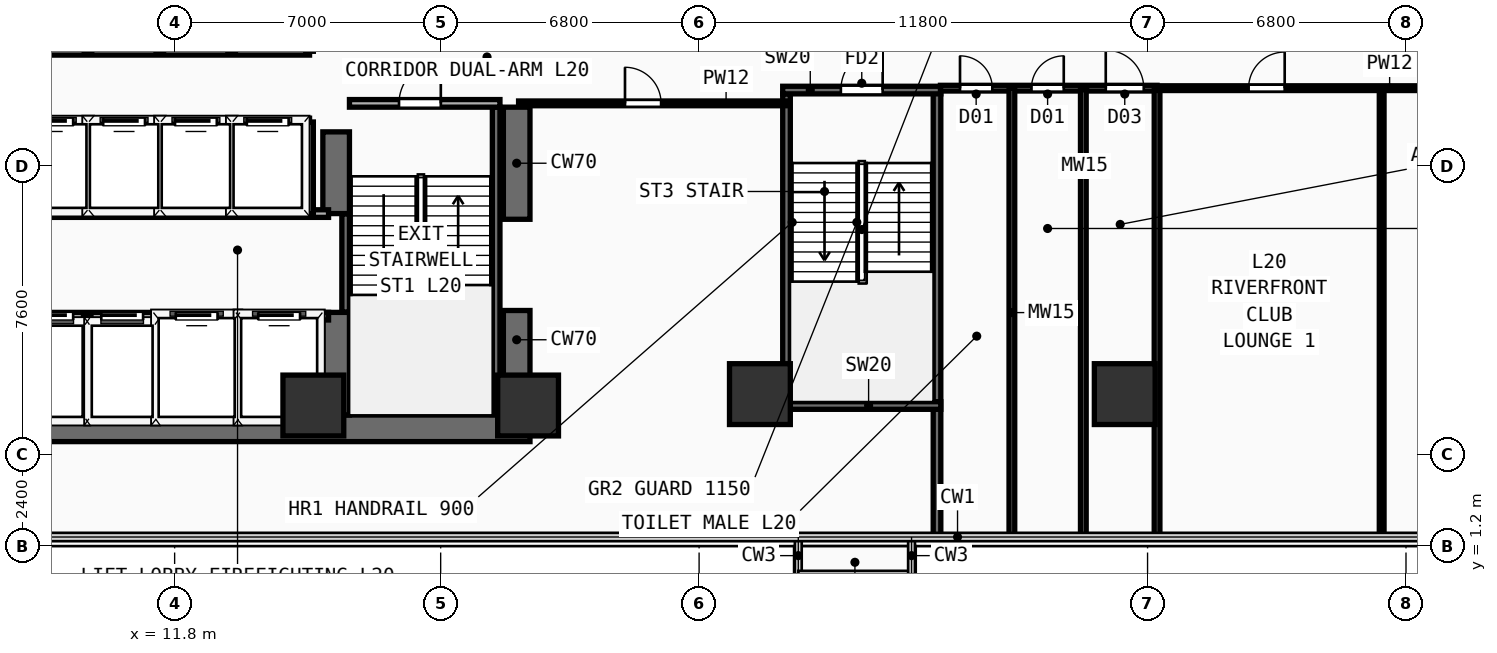
"""IFC4 building model, lengths in metres.
Left out: names, types, materials, properties, quantities, classifications, styles, units other than length and angle.
Written with IfcOpenShell. Run it as: python <this file> out.ifc"""

import sys

from ifc_helpers import new_model, si_unit, direction, frame, frame_2d, origin, origin_2d, place, context, subcontext, project, spatial, rectangle, extrude, element, fill, save


model = new_model("IFC4")
c1 = context("Model", 3, precision=1e-05, world=origin(), true_north=direction((0.0, 1.0)))
c2 = subcontext(c1, "Body", "Model", "MODEL_VIEW")
j1 = project(units=[si_unit("LENGTHUNIT", "METRE"), si_unit("PLANEANGLEUNIT", "RADIAN")], contexts=[c1])
p1 = place(None, origin())
s1 = spatial("IfcSite", under=j1, at=p1, CompositionType="ELEMENT")
p2 = place(p1, origin())
s2 = spatial("IfcBuilding", under=s1, at=p2, CompositionType="ELEMENT")
p3 = place(p2, frame((0.0, 0.0, 79.0)))
s3 = spatial("IfcBuildingStorey", under=s2, at=p3, CompositionType="ELEMENT", Elevation=79.0)
p4 = place(p3, frame((7.1, 4.3, 0.0), z_axis=(0.0, 0.0, 1.0), x_axis=(1.0, 0.0, 0.0)))
e1 = element("IfcWall", 1, at=p4, inside=s3, PredefinedType="SHEAR", context=c2, shape_type="SweptSolid", body=[
    extrude(rectangle(XDim=14.05, YDim=0.7, at=frame_2d((7.025, 0.0))), origin(), (0.0, 0.0, 1.0), 3.42),
])
p5 = place(p3, frame((20.8, 4.65, 0.0), z_axis=(0.0, 0.0, 1.0), x_axis=(0.0, 1.0, 0.0)))
e2 = element("IfcWall", 2, at=p5, inside=s3, PredefinedType="SHEAR", context=c2, shape_type="SweptSolid", body=[
    extrude(rectangle(XDim=2.75, YDim=0.7, at=frame_2d((1.375, 0.0))), origin(), (0.0, 0.0, 1.0), 3.42),
])
p6 = place(p3, frame((20.8, 9.8, 0.0), z_axis=(0.0, 0.0, 1.0), x_axis=(0.0, 1.0, 0.0)))
e3 = element("IfcWall", 3, at=p6, inside=s3, PredefinedType="SHEAR", context=c2, shape_type="SweptSolid", body=[
    extrude(rectangle(XDim=2.95, YDim=0.7, at=frame_2d((1.475, 0.0))), origin(), (0.0, 0.0, 1.0), 3.42),
])
p7 = place(p3, frame((16.05, 4.65, 0.0), z_axis=(0.0, 0.0, 1.0), x_axis=(0.0, 1.0, 0.0)))
e4 = element("IfcWall", 4, at=p7, inside=s3, PredefinedType="SHEAR", context=c2, shape_type="SweptSolid", body=[
    extrude(rectangle(XDim=2.7, YDim=0.7, at=frame_2d((1.35, 0.0))), origin(), (0.0, 0.0, 1.0), 3.42),
])
p8 = place(p3, frame((16.05, 9.95, 0.0), z_axis=(0.0, 0.0, 1.0), x_axis=(0.0, 1.0, 0.0)))
e5 = element("IfcWall", 5, at=p8, inside=s3, PredefinedType="SHEAR", context=c2, shape_type="SweptSolid", body=[
    extrude(rectangle(XDim=2.15, YDim=0.7, at=frame_2d((1.075, 0.0))), origin(), (0.0, 0.0, 1.0), 3.42),
])
for number, where, z_axis, x_axis in (
    (6, (15.45, 4.9, 0.0), (0.0, 0.0, 1.0), (1.0, 0.0, 0.0)),
    (7, (21.1, 4.9, 0.0), (0.0, 0.0, 1.0), (1.0, 0.0, 0.0)),
    (8, (27.2, 5.2, 0.0), (0.0, 0.0, 1.0), (1.0, 0.0, 0.0)),
    (9, (36.8, 5.2, 0.0), (0.0, 0.0, 1.0), (1.0, 0.0, 0.0)),
):
    element("IfcColumn", number, at=place(p3, frame(where, z_axis=z_axis, x_axis=x_axis)), inside=s3, PredefinedType="COLUMN", context=c2, shape_type="SweptSolid", body=[
        extrude(rectangle(XDim=1.6, YDim=1.6, at=origin_2d()), origin(), (0.0, 0.0, 1.0), 3.42),
    ])
p9 = place(p3, frame((16.3, 7.36, 0.0), z_axis=(0.0, 0.0, 1.0), x_axis=(0.0, 1.0, 0.0)))
e10 = element("IfcWall", 10, at=p9, inside=s3, PredefinedType="SHEAR", context=c2, shape_type="SweptSolid", body=[
    extrude(rectangle(XDim=2.58, YDim=0.2, at=frame_2d((1.29, 0.0))), origin(), (0.0, 0.0, 1.0), 3.42),
])
p10 = place(p3, frame((20.26, 4.66, 0.0), z_axis=(0.0, 0.0, 1.0), x_axis=(0.0, 1.0, 0.0)))
e11 = element("IfcWall", 11, at=p10, inside=s3, PredefinedType="SHEAR", context=c2, shape_type="SweptSolid", body=[
    extrude(rectangle(XDim=8.09, YDim=0.2, at=frame_2d((4.045, 0.0))), origin(), (0.0, 0.0, 1.0), 3.42),
])
p11 = place(p3, frame((16.4, 12.85, 0.0), z_axis=(0.0, 0.0, 1.0), x_axis=(1.0, 0.0, 0.0)))
e12 = element("IfcWall", 12, at=p11, inside=s3, PredefinedType="PARTITIONING", context=c2, shape_type="SweptSolid", body=[
    extrude(rectangle(XDim=3.96, YDim=0.2, at=frame_2d((1.98, 0.0))), origin(), (0.0, 0.0, 1.0), 3.42),
])
p12 = place(p11, frame((1.304, 0.0, 0.0)))
e13 = element("IfcOpeningElement", 13, at=p12, cuts=e12, PredefinedType="OPENING", context=c2, shape_type="SweptSolid", body=[
    extrude(rectangle(XDim=1.1, YDim=2.2, at=frame_2d((0.55, 1.1))), frame((0.0, 0.11, 0.0), z_axis=(0.0, -1.0, 0.0), x_axis=(1.0, 0.0, 0.0)), (0.0, 0.0, 1.0), 0.22),
])
p13 = place(p3, frame((27.9, 5.0, 0.0), z_axis=(0.0, 0.0, 1.0), x_axis=(0.0, 1.0, 0.0)))
e14 = element("IfcWall", 14, at=p13, inside=s3, PredefinedType="SHEAR", context=c2, shape_type="SweptSolid", body=[
    extrude(rectangle(XDim=8.1, YDim=0.2, at=frame_2d((4.05, 0.0))), origin(), (0.0, 0.0, 1.0), 3.42),
])
p14 = place(p3, frame((31.86, 1.44, 0.0), z_axis=(0.0, 0.0, 1.0), x_axis=(0.0, 1.0, 0.0)))
e15 = element("IfcWall", 15, at=p14, inside=s3, PredefinedType="SHEAR", context=c2, shape_type="SweptSolid", body=[
    extrude(rectangle(XDim=11.81, YDim=0.2, at=frame_2d((5.905, 0.0))), origin(), (0.0, 0.0, 1.0), 3.42),
])
p15 = place(p3, frame((27.8, 4.9, 0.0), z_axis=(0.0, 0.0, 1.0), x_axis=(1.0, 0.0, 0.0)))
e16 = element("IfcWall", 16, at=p15, inside=s3, PredefinedType="SHEAR", context=c2, shape_type="SweptSolid", body=[
    extrude(rectangle(XDim=4.16, YDim=0.2, at=frame_2d((2.08, 0.0))), origin(), (0.0, 0.0, 1.0), 3.42),
])
p16 = place(p3, frame((27.8, 13.2, 0.0), z_axis=(0.0, 0.0, 1.0), x_axis=(1.0, 0.0, 0.0)))
e17 = element("IfcWall", 17, at=p16, inside=s3, PredefinedType="SHEAR", context=c2, shape_type="SweptSolid", body=[
    extrude(rectangle(XDim=4.16, YDim=0.2, at=frame_2d((2.08, 0.0))), origin(), (0.0, 0.0, 1.0), 3.42),
])
p17 = place(p16, frame((1.53, 0.0, 0.0)))
e18 = element("IfcOpeningElement", 18, at=p17, cuts=e17, PredefinedType="OPENING", context=c2, shape_type="SweptSolid", body=[
    extrude(rectangle(XDim=1.1, YDim=2.2, at=frame_2d((0.55, 1.1))), frame((0.0, 0.11, 0.0), z_axis=(0.0, -1.0, 0.0), x_axis=(1.0, 0.0, 0.0)), (0.0, 0.0, 1.0), 0.22),
])
p18 = place(p3, frame((7.5, 7.25, 0.0), z_axis=(0.0, 0.0, 1.0), x_axis=(1.0, 0.0, 0.0)))
e19 = element("IfcWall", 19, at=p18, inside=s3, PredefinedType="PARTITIONING", context=c2, shape_type="SweptSolid", body=[
    extrude(rectangle(XDim=8.35, YDim=0.2, at=frame_2d((4.175, 0.0))), origin(), (0.0, 0.0, 1.0), 3.42),
])
p19 = place(p18, frame((0.53, 0.0, 0.0)))
e20 = element("IfcOpeningElement", 20, at=p19, cuts=e19, PredefinedType="OPENING", context=c2, shape_type="SweptSolid", body=[
    extrude(rectangle(XDim=1.1, YDim=2.2, at=frame_2d((0.55, 1.1))), frame((0.0, 0.11, 0.0), z_axis=(0.0, -1.0, 0.0), x_axis=(1.0, 0.0, 0.0)), (0.0, 0.0, 1.0), 0.22),
])
p20 = place(p18, frame((2.37, 0.0, 0.0)))
e21 = element("IfcOpeningElement", 21, at=p20, cuts=e19, PredefinedType="OPENING", context=c2, shape_type="SweptSolid", body=[
    extrude(rectangle(XDim=1.1, YDim=2.2, at=frame_2d((0.55, 1.1))), frame((0.0, 0.11, 0.0), z_axis=(0.0, -1.0, 0.0), x_axis=(1.0, 0.0, 0.0)), (0.0, 0.0, 1.0), 0.22),
])
p21 = place(p18, frame((4.33, 0.0, 0.0)))
e22 = element("IfcOpeningElement", 22, at=p21, cuts=e19, PredefinedType="OPENING", context=c2, shape_type="SweptSolid", body=[
    extrude(rectangle(XDim=1.1, YDim=2.2, at=frame_2d((0.55, 1.1))), frame((0.0, 0.11, 0.0), z_axis=(0.0, -1.0, 0.0), x_axis=(1.0, 0.0, 0.0)), (0.0, 0.0, 1.0), 0.22),
])
p22 = place(p18, frame((6.5, 0.0, 0.0)))
e23 = element("IfcOpeningElement", 23, at=p22, cuts=e19, PredefinedType="OPENING", context=c2, shape_type="SweptSolid", body=[
    extrude(rectangle(XDim=1.1, YDim=2.2, at=frame_2d((0.55, 1.1))), frame((0.0, 0.11, 0.0), z_axis=(0.0, -1.0, 0.0), x_axis=(1.0, 0.0, 0.0)), (0.0, 0.0, 1.0), 0.22),
])
p23 = place(p3, frame((7.5, 9.95, 0.0), z_axis=(0.0, 0.0, 1.0), x_axis=(1.0, 0.0, 0.0)))
e24 = element("IfcWall", 24, at=p23, inside=s3, PredefinedType="PARTITIONING", context=c2, shape_type="SweptSolid", body=[
    extrude(rectangle(XDim=8.35, YDim=0.2, at=frame_2d((4.175, 0.0))), origin(), (0.0, 0.0, 1.0), 3.42),
])
for number, where, z_axis, x_axis in (
    (25, (9.5, 4.45, 0.0), (0.0, 0.0, 1.0), (0.0, 1.0, 0.0)),
    (26, (11.36, 4.45, 0.0), (0.0, 0.0, 1.0), (0.0, 1.0, 0.0)),
    (27, (13.46, 4.45, 0.0), (0.0, 0.0, 1.0), (0.0, 1.0, 0.0)),
):
    element("IfcWall", number, at=place(p3, frame(where, z_axis=z_axis, x_axis=x_axis)), inside=s3, PredefinedType="PARTITIONING", context=c2, shape_type="SweptSolid", body=[
        extrude(rectangle(XDim=2.8, YDim=0.2, at=frame_2d((1.4, 0.0))), origin(), (0.0, 0.0, 1.0), 3.42),
    ])
p24 = place(p3, frame((7.5, 12.36, 0.0), z_axis=(0.0, 0.0, 1.0), x_axis=(1.0, 0.0, 0.0)))
e28 = element("IfcWall", 28, at=p24, inside=s3, PredefinedType="PARTITIONING", context=c2, shape_type="SweptSolid", body=[
    extrude(rectangle(XDim=7.85, YDim=0.2, at=frame_2d((3.925, 0.0))), origin(), (0.0, 0.0, 1.0), 3.42),
])
p25 = place(p24, frame((0.53, 0.0, 0.0)))
e29 = element("IfcOpeningElement", 29, at=p25, cuts=e28, PredefinedType="OPENING", context=c2, shape_type="SweptSolid", body=[
    extrude(rectangle(XDim=1.1, YDim=2.2, at=frame_2d((0.55, 1.1))), frame((0.0, 0.11, 0.0), z_axis=(0.0, -1.0, 0.0), x_axis=(1.0, 0.0, 0.0)), (0.0, 0.0, 1.0), 0.22),
])
p26 = place(p24, frame((2.42, 0.0, 0.0)))
e30 = element("IfcOpeningElement", 30, at=p26, cuts=e28, PredefinedType="OPENING", context=c2, shape_type="SweptSolid", body=[
    extrude(rectangle(XDim=1.1, YDim=2.2, at=frame_2d((0.55, 1.1))), frame((0.0, 0.11, 0.0), z_axis=(0.0, -1.0, 0.0), x_axis=(1.0, 0.0, 0.0)), (0.0, 0.0, 1.0), 0.22),
])
p27 = place(p24, frame((4.31, 0.0, 0.0)))
e31 = element("IfcOpeningElement", 31, at=p27, cuts=e28, PredefinedType="OPENING", context=c2, shape_type="SweptSolid", body=[
    extrude(rectangle(XDim=1.1, YDim=2.2, at=frame_2d((0.55, 1.1))), frame((0.0, 0.11, 0.0), z_axis=(0.0, -1.0, 0.0), x_axis=(1.0, 0.0, 0.0)), (0.0, 0.0, 1.0), 0.22),
])
p28 = place(p24, frame((6.2, 0.0, 0.0)))
e32 = element("IfcOpeningElement", 32, at=p28, cuts=e28, PredefinedType="OPENING", context=c2, shape_type="SweptSolid", body=[
    extrude(rectangle(XDim=1.1, YDim=2.2, at=frame_2d((0.55, 1.1))), frame((0.0, 0.11, 0.0), z_axis=(0.0, -1.0, 0.0), x_axis=(1.0, 0.0, 0.0)), (0.0, 0.0, 1.0), 0.22),
])
for number, where, z_axis, x_axis in (
    (33, (15.35, 9.95, 0.0), (0.0, 0.0, 1.0), (0.0, 1.0, 0.0)),
    (34, (9.52, 9.95, 0.0), (0.0, 0.0, 1.0), (0.0, 1.0, 0.0)),
    (35, (11.41, 9.95, 0.0), (0.0, 0.0, 1.0), (0.0, 1.0, 0.0)),
    (36, (13.3, 9.95, 0.0), (0.0, 0.0, 1.0), (0.0, 1.0, 0.0)),
):
    element("IfcWall", number, at=place(p3, frame(where, z_axis=z_axis, x_axis=x_axis)), inside=s3, PredefinedType="PARTITIONING", context=c2, shape_type="SweptSolid", body=[
        extrude(rectangle(XDim=2.41, YDim=0.2, at=frame_2d((1.205, 0.0))), origin(), (0.0, 0.0, 1.0), 3.42),
    ])
p29 = place(p3, frame((7.5, 14.22, 0.0), z_axis=(0.0, 0.0, 1.0), x_axis=(1.0, 0.0, 0.0)))
e37 = element("IfcWall", 37, at=p29, inside=s3, PredefinedType="PARTITIONING", context=c2, shape_type="SweptSolid", body=[
    extrude(rectangle(XDim=7.85, YDim=0.2, at=frame_2d((3.925, 0.0))), origin(), (0.0, 0.0, 1.0), 3.42),
])
p30 = place(p3, frame((31.95, 13.25, 0.0), z_axis=(0.0, 0.0, 1.0), x_axis=(1.0, 0.0, 0.0)))
e38 = element("IfcWall", 38, at=p30, inside=s3, PredefinedType="PLUMBINGWALL", context=c2, shape_type="SweptSolid", body=[
    extrude(rectangle(XDim=5.7, YDim=0.15, at=frame_2d((2.85, 0.0))), origin(), (0.0, 0.0, 1.0), 2.92),
])
p31 = place(p30, frame((0.515, 0.0, 0.0)))
e39 = element("IfcOpeningElement", 39, at=p31, cuts=e38, PredefinedType="OPENING", context=c2, shape_type="SweptSolid", body=[
    extrude(rectangle(XDim=0.85, YDim=2.15, at=frame_2d((0.425, 1.075))), frame((0.0, 0.085, 0.0), z_axis=(0.0, -1.0, 0.0), x_axis=(1.0, 0.0, 0.0)), (0.0, 0.0, 1.0), 0.17),
])
p32 = place(p30, frame((2.395, 0.0, 0.0)))
e40 = element("IfcOpeningElement", 40, at=p32, cuts=e38, PredefinedType="OPENING", context=c2, shape_type="SweptSolid", body=[
    extrude(rectangle(XDim=0.85, YDim=2.15, at=frame_2d((0.425, 1.075))), frame((0.0, 0.085, 0.0), z_axis=(0.0, -1.0, 0.0), x_axis=(1.0, 0.0, 0.0)), (0.0, 0.0, 1.0), 0.17),
])
p33 = place(p30, frame((4.35, 0.0, 0.0)))
e41 = element("IfcOpeningElement", 41, at=p33, cuts=e38, PredefinedType="OPENING", context=c2, shape_type="SweptSolid", body=[
    extrude(rectangle(XDim=1.0, YDim=2.2, at=frame_2d((0.5, 1.1))), frame((0.0, 0.085, 0.0), z_axis=(0.0, -1.0, 0.0), x_axis=(1.0, 0.0, 0.0)), (0.0, 0.0, 1.0), 0.17),
])
for number, where, z_axis, x_axis in (
    (42, (33.83, 1.44, 0.0), (0.0, 0.0, 1.0), (0.0, 1.0, 0.0)),
    (43, (35.71, 1.44, 0.0), (0.0, 0.0, 1.0), (0.0, 1.0, 0.0)),
    (44, (37.65, 1.44, 0.0), (0.0, 0.0, 1.0), (0.0, 1.0, 0.0)),
):
    element("IfcWall", number, at=place(p3, frame(where, z_axis=z_axis, x_axis=x_axis)), inside=s3, PredefinedType="PLUMBINGWALL", context=c2, shape_type="SweptSolid", body=[
        extrude(rectangle(XDim=11.81, YDim=0.15, at=frame_2d((5.905, 0.0))), origin(), (0.0, 0.0, 1.0), 3.42),
    ])
p34 = place(p3, frame((20.85, 12.85, 0.0), z_axis=(0.0, 0.0, 1.0), x_axis=(1.0, 0.0, 0.0)))
e45 = element("IfcWall", 45, at=p34, inside=s3, PredefinedType="PARTITIONING", context=c2, shape_type="SweptSolid", body=[
    extrude(rectangle(XDim=7.05, YDim=0.125, at=frame_2d((3.525, 0.0))), origin(), (0.0, 0.0, 1.0), 3.42),
])
p35 = place(p34, frame((2.8, 0.0, 0.0)))
e46 = element("IfcOpeningElement", 46, at=p35, cuts=e45, PredefinedType="OPENING", context=c2, shape_type="SweptSolid", body=[
    extrude(rectangle(XDim=0.95, YDim=2.15, at=frame_2d((0.475, 1.075))), frame((0.0, 0.073, 0.0), z_axis=(0.0, -1.0, 0.0), x_axis=(1.0, 0.0, 0.0)), (0.0, 0.0, 1.0), 0.145),
])
p36 = place(p3, frame((37.65, 13.25, 0.0), z_axis=(0.0, 0.0, 1.0), x_axis=(1.0, 0.0, 0.0)))
e47 = element("IfcWall", 47, at=p36, inside=s3, PredefinedType="PARTITIONING", context=c2, shape_type="SweptSolid", body=[
    extrude(rectangle(XDim=13.75, YDim=0.125, at=frame_2d((6.875, 0.0))), origin(), (0.0, 0.0, 1.0), 2.92),
])
p37 = place(p36, frame((2.408, 0.0, 0.0)))
e48 = element("IfcOpeningElement", 48, at=p37, cuts=e47, PredefinedType="OPENING", context=c2, shape_type="SweptSolid", body=[
    extrude(rectangle(XDim=0.95, YDim=2.15, at=frame_2d((0.475, 1.075))), frame((0.0, 0.073, 0.0), z_axis=(0.0, -1.0, 0.0), x_axis=(1.0, 0.0, 0.0)), (0.0, 0.0, 1.0), 0.145),
])
p38 = place(p36, frame((8.88, 0.0, 0.0)))
e49 = element("IfcOpeningElement", 49, at=p38, cuts=e47, PredefinedType="OPENING", context=c2, shape_type="SweptSolid", body=[
    extrude(rectangle(XDim=0.95, YDim=2.15, at=frame_2d((0.475, 1.075))), frame((0.0, 0.073, 0.0), z_axis=(0.0, -1.0, 0.0), x_axis=(1.0, 0.0, 0.0)), (0.0, 0.0, 1.0), 0.145),
])
p39 = place(p3, frame((43.56, 1.44, 0.0), z_axis=(0.0, 0.0, 1.0), x_axis=(0.0, 1.0, 0.0)))
e50 = element("IfcWall", 50, at=p39, inside=s3, PredefinedType="PARTITIONING", context=c2, shape_type="SweptSolid", body=[
    extrude(rectangle(XDim=11.81, YDim=0.125, at=frame_2d((5.905, 0.0))), origin(), (0.0, 0.0, 1.0), 3.42),
])
p40 = place(p12, frame((1.1, 0.0, 0.0), z_axis=(0.0, 0.0, 1.0), x_axis=(-1.0, 0.0, 0.0)))
e51 = element("IfcDoor", 51, at=p40, inside=s3, OperationType="SINGLE_SWING_LEFT", PredefinedType="DOOR", context=c2, shape_type="SweptSolid", body=[
    extrude(rectangle(XDim=1.1, YDim=2.2, at=frame_2d((0.55, 1.1))), frame((0.0, 0.025, 0.0), z_axis=(0.0, -1.0, 0.0), x_axis=(1.0, 0.0, 0.0)), (0.0, 0.0, 1.0), 0.05),
])
fill(e13, e51)
p41 = place(p17, frame((1.1, 0.0, 0.0), z_axis=(0.0, 0.0, 1.0), x_axis=(-1.0, 0.0, 0.0)))
e52 = element("IfcDoor", 52, at=p41, inside=s3, OperationType="SINGLE_SWING_LEFT", PredefinedType="DOOR", context=c2, shape_type="SweptSolid", body=[
    extrude(rectangle(XDim=1.1, YDim=2.2, at=frame_2d((0.55, 1.1))), frame((0.0, 0.025, 0.0), z_axis=(0.0, -1.0, 0.0), x_axis=(1.0, 0.0, 0.0)), (0.0, 0.0, 1.0), 0.05),
])
fill(e18, e52)
p42 = place(p19, origin())
e53 = element("IfcDoor", 53, at=p42, inside=s3, OperationType="SLIDING_TO_LEFT", PredefinedType="DOOR", context=c2, shape_type="SweptSolid", body=[
    extrude(rectangle(XDim=1.1, YDim=2.2, at=frame_2d((0.55, 1.1))), frame((0.0, 0.025, 0.0), z_axis=(0.0, -1.0, 0.0), x_axis=(1.0, 0.0, 0.0)), (0.0, 0.0, 1.0), 0.05),
])
fill(e20, e53)
p43 = place(p20, origin())
e54 = element("IfcDoor", 54, at=p43, inside=s3, OperationType="SLIDING_TO_LEFT", PredefinedType="DOOR", context=c2, shape_type="SweptSolid", body=[
    extrude(rectangle(XDim=1.1, YDim=2.2, at=frame_2d((0.55, 1.1))), frame((0.0, 0.025, 0.0), z_axis=(0.0, -1.0, 0.0), x_axis=(1.0, 0.0, 0.0)), (0.0, 0.0, 1.0), 0.05),
])
fill(e21, e54)
p44 = place(p21, origin())
e55 = element("IfcDoor", 55, at=p44, inside=s3, OperationType="SLIDING_TO_LEFT", PredefinedType="DOOR", context=c2, shape_type="SweptSolid", body=[
    extrude(rectangle(XDim=1.1, YDim=2.2, at=frame_2d((0.55, 1.1))), frame((0.0, 0.025, 0.0), z_axis=(0.0, -1.0, 0.0), x_axis=(1.0, 0.0, 0.0)), (0.0, 0.0, 1.0), 0.05),
])
fill(e22, e55)
p45 = place(p22, origin())
e56 = element("IfcDoor", 56, at=p45, inside=s3, OperationType="SLIDING_TO_LEFT", PredefinedType="DOOR", context=c2, shape_type="SweptSolid", body=[
    extrude(rectangle(XDim=1.1, YDim=2.2, at=frame_2d((0.55, 1.1))), frame((0.0, 0.025, 0.0), z_axis=(0.0, -1.0, 0.0), x_axis=(1.0, 0.0, 0.0)), (0.0, 0.0, 1.0), 0.05),
])
fill(e23, e56)
p46 = place(p25, origin())
e57 = element("IfcDoor", 57, at=p46, inside=s3, OperationType="SLIDING_TO_LEFT", PredefinedType="DOOR", context=c2, shape_type="SweptSolid", body=[
    extrude(rectangle(XDim=1.1, YDim=2.2, at=frame_2d((0.55, 1.1))), frame((0.0, 0.025, 0.0), z_axis=(0.0, -1.0, 0.0), x_axis=(1.0, 0.0, 0.0)), (0.0, 0.0, 1.0), 0.05),
])
fill(e29, e57)
p47 = place(p26, origin())
e58 = element("IfcDoor", 58, at=p47, inside=s3, OperationType="SLIDING_TO_LEFT", PredefinedType="DOOR", context=c2, shape_type="SweptSolid", body=[
    extrude(rectangle(XDim=1.1, YDim=2.2, at=frame_2d((0.55, 1.1))), frame((0.0, 0.025, 0.0), z_axis=(0.0, -1.0, 0.0), x_axis=(1.0, 0.0, 0.0)), (0.0, 0.0, 1.0), 0.05),
])
fill(e30, e58)
p48 = place(p27, origin())
e59 = element("IfcDoor", 59, at=p48, inside=s3, OperationType="SLIDING_TO_LEFT", PredefinedType="DOOR", context=c2, shape_type="SweptSolid", body=[
    extrude(rectangle(XDim=1.1, YDim=2.2, at=frame_2d((0.55, 1.1))), frame((0.0, 0.025, 0.0), z_axis=(0.0, -1.0, 0.0), x_axis=(1.0, 0.0, 0.0)), (0.0, 0.0, 1.0), 0.05),
])
fill(e31, e59)
p49 = place(p28, origin())
e60 = element("IfcDoor", 60, at=p49, inside=s3, OperationType="SLIDING_TO_LEFT", PredefinedType="DOOR", context=c2, shape_type="SweptSolid", body=[
    extrude(rectangle(XDim=1.1, YDim=2.2, at=frame_2d((0.55, 1.1))), frame((0.0, 0.025, 0.0), z_axis=(0.0, -1.0, 0.0), x_axis=(1.0, 0.0, 0.0)), (0.0, 0.0, 1.0), 0.05),
])
fill(e32, e60)
p50 = place(p31, origin())
e61 = element("IfcDoor", 61, at=p50, inside=s3, OperationType="SINGLE_SWING_LEFT", PredefinedType="DOOR", context=c2, shape_type="SweptSolid", body=[
    extrude(rectangle(XDim=0.85, YDim=2.15, at=frame_2d((0.425, 1.075))), frame((0.0, 0.025, 0.0), z_axis=(0.0, -1.0, 0.0), x_axis=(1.0, 0.0, 0.0)), (0.0, 0.0, 1.0), 0.05),
])
fill(e39, e61)
p51 = place(p32, origin())
e62 = element("IfcDoor", 62, at=p51, inside=s3, OperationType="SINGLE_SWING_RIGHT", PredefinedType="DOOR", context=c2, shape_type="SweptSolid", body=[
    extrude(rectangle(XDim=0.85, YDim=2.15, at=frame_2d((0.425, 1.075))), frame((0.0, 0.025, 0.0), z_axis=(0.0, -1.0, 0.0), x_axis=(1.0, 0.0, 0.0)), (0.0, 0.0, 1.0), 0.05),
])
fill(e40, e62)
p52 = place(p33, origin())
e63 = element("IfcDoor", 63, at=p52, inside=s3, OperationType="SINGLE_SWING_LEFT", PredefinedType="DOOR", context=c2, shape_type="SweptSolid", body=[
    extrude(rectangle(XDim=1.0, YDim=2.2, at=frame_2d((0.5, 1.1))), frame((0.0, 0.025, 0.0), z_axis=(0.0, -1.0, 0.0), x_axis=(1.0, 0.0, 0.0)), (0.0, 0.0, 1.0), 0.05),
])
fill(e41, e63)
p53 = place(p35, origin())
e64 = element("IfcDoor", 64, at=p53, inside=s3, OperationType="SINGLE_SWING_LEFT", PredefinedType="DOOR", context=c2, shape_type="SweptSolid", body=[
    extrude(rectangle(XDim=0.95, YDim=2.15, at=frame_2d((0.475, 1.075))), frame((0.0, 0.025, 0.0), z_axis=(0.0, -1.0, 0.0), x_axis=(1.0, 0.0, 0.0)), (0.0, 0.0, 1.0), 0.05),
])
fill(e46, e64)
p54 = place(p37, origin())
e65 = element("IfcDoor", 65, at=p54, inside=s3, OperationType="SINGLE_SWING_RIGHT", PredefinedType="DOOR", context=c2, shape_type="SweptSolid", body=[
    extrude(rectangle(XDim=0.95, YDim=2.15, at=frame_2d((0.475, 1.075))), frame((0.0, 0.025, 0.0), z_axis=(0.0, -1.0, 0.0), x_axis=(1.0, 0.0, 0.0)), (0.0, 0.0, 1.0), 0.05),
])
fill(e48, e65)
save(model, sys.argv[1])
